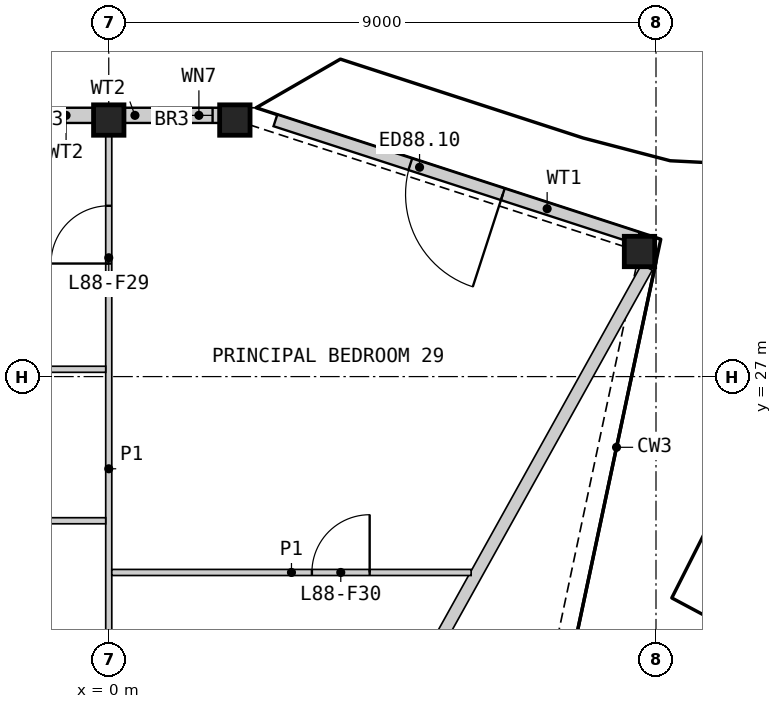
"""IFC4 building model, lengths in metres.
Left out: names, types, materials, properties, quantities, classifications, styles, units other than length and angle.
Written with IfcOpenShell. Run it as: python <this file> out.ifc"""

import sys

from ifc_helpers import new_model, si_unit, direction, frame, frame_2d, origin, origin_2d, place, context, subcontext, project, spatial, rectangle, hollow_rectangle, extrude, element, fill, save


model = new_model("IFC4")
c1 = context("Model", 3, precision=1e-05, world=origin(), true_north=direction((0.0, 1.0)))
c2 = subcontext(c1, "Body", "Model", "MODEL_VIEW")
j1 = project(units=[si_unit("LENGTHUNIT", "METRE"), si_unit("PLANEANGLEUNIT", "RADIAN")], contexts=[c1])
p1 = place(None, origin())
s1 = spatial("IfcSite", under=j1, at=p1, CompositionType="ELEMENT")
p2 = place(p1, origin())
s2 = spatial("IfcBuilding", under=s1, at=p2, CompositionType="ELEMENT")
p3 = place(p2, frame((0.0, 0.0, 388.2)))
s3 = spatial("IfcBuildingStorey", under=s2, at=p3, CompositionType="ELEMENT", Elevation=388.2)
for number, where, z_axis, x_axis in (
    (1, (8.729, 29.057, 0.0), (0.0, 0.0, 1.0), (1.0, 0.0, 0.0)),
    (2, (2.074, 31.219, 0.0), (0.0, 0.0, 1.0), (1.0, 0.0, 0.0)),
    (3, (0.0, 31.219, 0.0), (0.0, 0.0, 1.0), (1.0, 0.0, 0.0)),
):
    element("IfcColumn", number, at=place(p3, frame(where, z_axis=z_axis, x_axis=x_axis)), inside=s3, PredefinedType="COLUMN", context=c2, shape_type="SweptSolid", body=[
        extrude(hollow_rectangle(XDim=0.5, YDim=0.5, WallThickness=0.03, at=origin_2d()), origin(), (0.0, 0.0, 1.0), 3.4),
    ])
p4 = place(p3, frame((8.699, 29.277, 0.0), z_axis=(0.0, 0.0, 1.0), x_axis=(-0.951048671744, 0.309041136379, 0.0)))
e4 = element("IfcWall", 4, at=p4, inside=s3, PredefinedType="SOLIDWALL", context=c2, shape_type="SweptSolid", body=[
    extrude(rectangle(XDim=6.265, YDim=0.2, at=frame_2d((3.133, 0.0))), origin(), (0.0, 0.0, 1.0), 2.634),
])
p5 = place(p4, frame((2.333, 0.0, 0.0)))
e5 = element("IfcOpeningElement", 5, at=p5, cuts=e4, PredefinedType="OPENING", context=c2, shape_type="SweptSolid", body=[
    extrude(rectangle(XDim=1.6, YDim=2.25, at=frame_2d((0.8, 1.125))), frame((0.0, 0.11, 0.0), z_axis=(0.0, -1.0, 0.0), x_axis=(1.0, 0.0, 0.0)), (0.0, 0.0, 1.0), 0.22),
])
p6 = place(p3, frame((2.058, 31.296, 0.0), z_axis=(0.0, 0.0, 1.0), x_axis=(-1.0, 0.0, 0.0)))
e6 = element("IfcWall", 6, at=p6, inside=s3, PredefinedType="SOLIDWALL", context=c2, shape_type="SweptSolid", body=[
    extrude(rectangle(XDim=1.808, YDim=0.25, at=frame_2d((0.904, 0.0))), origin(), (0.0, 0.0, 1.0), 2.634),
])
p7 = place(p6, frame((0.35, 0.0, 1.8)))
e7 = element("IfcOpeningElement", 7, at=p7, cuts=e6, PredefinedType="OPENING", context=c2, shape_type="SweptSolid", body=[
    extrude(rectangle(XDim=0.9, YDim=0.6, at=frame_2d((0.45, 0.3))), frame((0.0, 0.135, 0.0), z_axis=(0.0, -1.0, 0.0), x_axis=(1.0, 0.0, 0.0)), (0.0, 0.0, 1.0), 0.27),
])
p8 = place(p3, frame((-0.25, 31.296, 0.0), z_axis=(0.0, 0.0, 1.0), x_axis=(-1.0, 0.0, 0.0)))
e8 = element("IfcWall", 8, at=p8, inside=s3, PredefinedType="SOLIDWALL", context=c2, shape_type="SweptSolid", body=[
    extrude(rectangle(XDim=1.808, YDim=0.25, at=frame_2d((0.904, 0.0))), origin(), (0.0, 0.0, 1.0), 2.634),
])
p9 = place(p3, frame((2.012, 16.498, 0.0), z_axis=(0.0, 0.0, 1.0), x_axis=(0.485991996179, 0.873963259897, 0.0)))
e9 = element("IfcWall", 9, at=p9, inside=s3, PredefinedType="PARTITIONING", context=c2, shape_type="SweptSolid", body=[
    extrude(rectangle(XDim=14.073, YDim=0.2, at=frame_2d((7.036, 0.0))), origin(), (0.0, 0.0, 1.0), 2.33),
])
p10 = place(p3, frame((0.0, 20.008, 0.0), z_axis=(0.0, 0.0, 1.0), x_axis=(0.0, 1.0, 0.0)))
e10 = element("IfcWall", 10, at=p10, inside=s3, PredefinedType="PARTITIONING", context=c2, shape_type="SweptSolid", body=[
    extrude(rectangle(XDim=10.951, YDim=0.1, at=frame_2d((5.476, 0.0))), origin(), (0.0, 0.0, 1.0), 2.33),
])
p11 = place(p10, frame((8.851, 0.0, 0.0)))
e11 = element("IfcOpeningElement", 11, at=p11, cuts=e10, PredefinedType="OPENING", context=c2, shape_type="SweptSolid", body=[
    extrude(rectangle(XDim=0.95, YDim=2.1, at=frame_2d((0.475, 1.05))), frame((0.0, 0.06, 0.0), z_axis=(0.0, -1.0, 0.0), x_axis=(1.0, 0.0, 0.0)), (0.0, 0.0, 1.0), 0.12),
])
p12 = place(p3, frame((-7.793, 27.12, 0.0), z_axis=(0.0, 0.0, 1.0), x_axis=(1.0, 0.0, 0.0)))
e12 = element("IfcWall", 12, at=p12, inside=s3, PredefinedType="PARTITIONING", context=c2, shape_type="SweptSolid", body=[
    extrude(rectangle(XDim=7.743, YDim=0.1, at=frame_2d((3.872, 0.0))), origin(), (0.0, 0.0, 1.0), 2.33),
])
p13 = place(p12, frame((3.701, 0.0, 0.0)))
e13 = element("IfcOpeningElement", 13, at=p13, cuts=e12, PredefinedType="OPENING", context=c2, shape_type="SweptSolid", body=[
    extrude(rectangle(XDim=0.95, YDim=2.1, at=frame_2d((0.475, 1.05))), frame((0.0, 0.06, 0.0), z_axis=(0.0, -1.0, 0.0), x_axis=(1.0, 0.0, 0.0)), (0.0, 0.0, 1.0), 0.12),
])
p14 = place(p3, frame((-6.408, 24.629, 0.0), z_axis=(0.0, 0.0, 1.0), x_axis=(1.0, 0.0, 0.0)))
e14 = element("IfcWall", 14, at=p14, inside=s3, PredefinedType="PARTITIONING", context=c2, shape_type="SweptSolid", body=[
    extrude(rectangle(XDim=6.358, YDim=0.1, at=frame_2d((3.179, 0.0))), origin(), (0.0, 0.0, 1.0), 2.33),
])
p15 = place(p14, frame((3.455, 0.0, 0.0)))
e15 = element("IfcOpeningElement", 15, at=p15, cuts=e14, PredefinedType="OPENING", context=c2, shape_type="SweptSolid", body=[
    extrude(rectangle(XDim=0.95, YDim=2.1, at=frame_2d((0.475, 1.05))), frame((0.0, 0.06, 0.0), z_axis=(0.0, -1.0, 0.0), x_axis=(1.0, 0.0, 0.0)), (0.0, 0.0, 1.0), 0.12),
])
p16 = place(p3, frame((0.05, 23.778, 0.0), z_axis=(0.0, 0.0, 1.0), x_axis=(1.0, 0.0, 0.0)))
e16 = element("IfcWall", 16, at=p16, inside=s3, PredefinedType="PARTITIONING", context=c2, shape_type="SweptSolid", body=[
    extrude(rectangle(XDim=5.91, YDim=0.1, at=frame_2d((2.955, 0.0))), origin(), (0.0, 0.0, 1.0), 2.33),
])
p17 = place(p16, frame((3.291, 0.0, 0.0)))
e17 = element("IfcOpeningElement", 17, at=p17, cuts=e16, PredefinedType="OPENING", context=c2, shape_type="SweptSolid", body=[
    extrude(rectangle(XDim=0.95, YDim=2.1, at=frame_2d((0.475, 1.05))), frame((0.0, 0.06, 0.0), z_axis=(0.0, -1.0, 0.0), x_axis=(1.0, 0.0, 0.0)), (0.0, 0.0, 1.0), 0.12),
])
p18 = place(p5, origin())
e18 = element("IfcDoor", 18, at=p18, inside=s3, OperationType="DOUBLE_DOOR_SINGLE_SWING", PredefinedType="DOOR", context=c2, shape_type="SweptSolid", body=[
    extrude(rectangle(XDim=1.6, YDim=2.25, at=frame_2d((0.8, 1.125))), frame((0.0, 0.025, 0.0), z_axis=(0.0, -1.0, 0.0), x_axis=(1.0, 0.0, 0.0)), (0.0, 0.0, 1.0), 0.05),
])
fill(e5, e18)
p19 = place(p7, origin())
e19 = element("IfcWindow", 19, at=p19, inside=s3, PartitioningType="SINGLE_PANEL", PredefinedType="WINDOW", context=c2, shape_type="SweptSolid", body=[
    extrude(rectangle(XDim=0.9, YDim=0.6, at=frame_2d((0.45, 0.3))), frame((0.0, 0.03, 0.0), z_axis=(0.0, -1.0, 0.0), x_axis=(1.0, 0.0, 0.0)), (0.0, 0.0, 1.0), 0.06),
])
fill(e7, e19)
p20 = place(p11, origin())
e20 = element("IfcDoor", 20, at=p20, inside=s3, OperationType="SINGLE_SWING_LEFT", PredefinedType="DOOR", context=c2, shape_type="SweptSolid", body=[
    extrude(rectangle(XDim=0.95, YDim=2.1, at=frame_2d((0.475, 1.05))), frame((0.0, 0.025, 0.0), z_axis=(0.0, -1.0, 0.0), x_axis=(1.0, 0.0, 0.0)), (0.0, 0.0, 1.0), 0.05),
])
fill(e11, e20)
p21 = place(p17, origin())
e21 = element("IfcDoor", 21, at=p21, inside=s3, OperationType="SINGLE_SWING_RIGHT", PredefinedType="DOOR", context=c2, shape_type="SweptSolid", body=[
    extrude(rectangle(XDim=0.95, YDim=2.1, at=frame_2d((0.475, 1.05))), frame((0.0, 0.025, 0.0), z_axis=(0.0, -1.0, 0.0), x_axis=(1.0, 0.0, 0.0)), (0.0, 0.0, 1.0), 0.05),
])
fill(e17, e21)
save(model, sys.argv[1])
